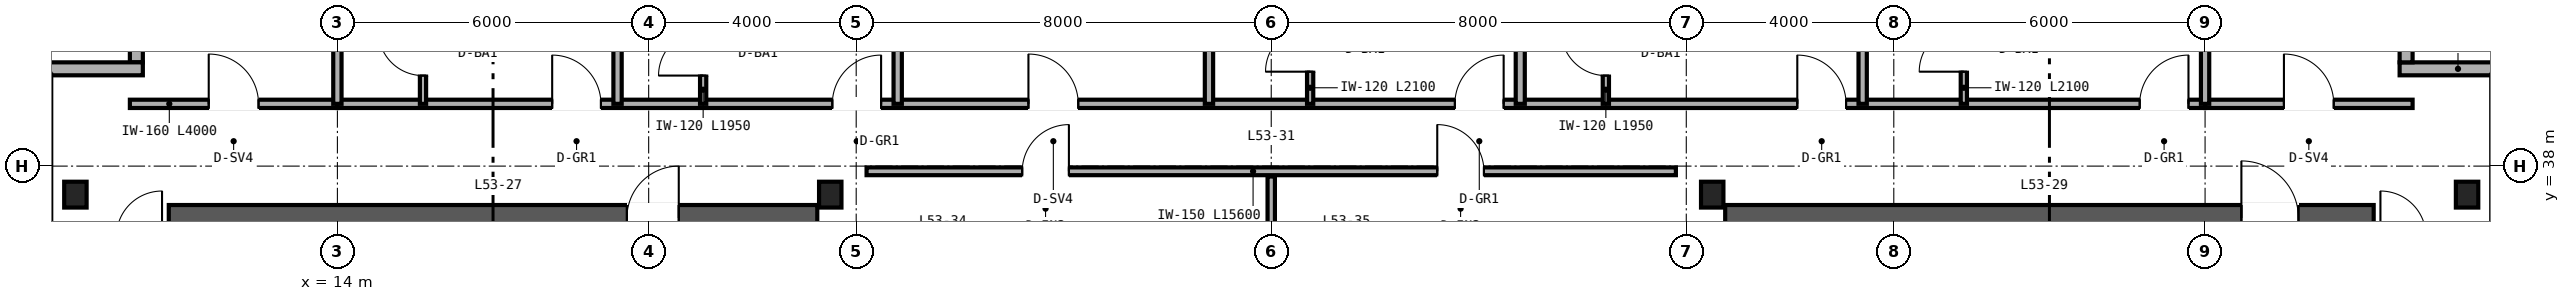
"""IFC4 building model, lengths in metres.
Left out: names, types, materials, properties, quantities, classifications, styles, units other than length and angle.
Written with IfcOpenShell. Run it as: python <this file> out.ifc"""

import sys

from ifc_helpers import new_model, si_unit, direction, frame, frame_2d, origin, origin_2d, place, context, subcontext, project, spatial, rectangle, i_section, extrude, source, transform, mapped, element, fill, save


model = new_model("IFC4")
c1 = context("Model", 3, precision=1e-05, world=origin(), true_north=direction((0.0, 1.0)))
c2 = subcontext(c1, "Body", "Model", "MODEL_VIEW")
j1 = project(units=[si_unit("LENGTHUNIT", "METRE"), si_unit("PLANEANGLEUNIT", "RADIAN")], contexts=[c1])
p1 = place(None, origin())
s1 = spatial("IfcSite", under=j1, at=p1, CompositionType="ELEMENT")
p2 = place(p1, origin())
s2 = spatial("IfcBuilding", under=s1, at=p2, CompositionType="ELEMENT")
p3 = place(p2, frame((0.0, 0.0, 210.0)))
s3 = spatial("IfcBuildingStorey", under=s2, at=p3, CompositionType="ELEMENT", Elevation=210.0)
p4 = place(p3, frame((10.75, 37.0, 0.0), z_axis=(0.0, 0.0, 1.0), x_axis=(1.0, 0.0, 0.0)))
e1 = element("IfcWall", 1, at=p4, inside=s3, PredefinedType="SHEAR", context=c2, shape_type="SweptSolid", body=[
    extrude(rectangle(XDim=12.5, YDim=0.5, at=frame_2d((6.25, 0.0))), origin(), (0.0, 0.0, 1.0), 3.37),
])
p5 = place(p4, frame((8.83, 0.0, 0.0)))
e2 = element("IfcOpeningElement", 2, at=p5, cuts=e1, PredefinedType="OPENING", context=c2, shape_type="SweptSolid", body=[
    extrude(rectangle(XDim=1.0, YDim=2.15, at=frame_2d((0.5, 1.075))), frame((0.0, 0.26, 0.0), z_axis=(0.0, -1.0, 0.0), x_axis=(1.0, 0.0, 0.0)), (0.0, 0.0, 1.0), 0.52),
])
p6 = place(p3, frame((40.75, 37.0, 0.0), z_axis=(0.0, 0.0, 1.0), x_axis=(1.0, 0.0, 0.0)))
e3 = element("IfcWall", 3, at=p6, inside=s3, PredefinedType="SHEAR", context=c2, shape_type="SweptSolid", body=[
    extrude(rectangle(XDim=12.5, YDim=0.5, at=frame_2d((6.25, 0.0))), origin(), (0.0, 0.0, 1.0), 3.37),
])
p7 = place(p6, frame((9.95, 0.0, 0.0)))
e4 = element("IfcOpeningElement", 4, at=p7, cuts=e3, PredefinedType="OPENING", context=c2, shape_type="SweptSolid", body=[
    extrude(rectangle(XDim=1.1, YDim=2.15, at=frame_2d((0.55, 1.075))), frame((0.0, 0.26, 0.0), z_axis=(0.0, -1.0, 0.0), x_axis=(1.0, 0.0, 0.0)), (0.0, 0.0, 1.0), 0.52),
])
m1 = source(origin(), c2, "Body", "SweptSolid", [
    extrude(i_section(OverallWidth=0.432, OverallDepth=0.498, WebThickness=0.056, FlangeThickness=0.089, FilletRadius=0.025, at=origin_2d()), origin(), (0.0, 0.0, 1.0), 3.37),
])
for number, where, z_axis, x_axis in (
    (5, (8.95, 37.45, 0.0), (0.0, 0.0, 1.0), (1.0, 0.0, 0.0)),
    (6, (23.5, 37.45, 0.0), (0.0, 0.0, 1.0), (1.0, 0.0, 0.0)),
    (7, (40.5, 37.45, 0.0), (0.0, 0.0, 1.0), (1.0, 0.0, 0.0)),
    (8, (55.05, 37.45, 0.0), (0.0, 0.0, 1.0), (1.0, 0.0, 0.0)),
):
    element("IfcColumn", number, at=place(p3, frame(where, z_axis=z_axis, x_axis=x_axis)), inside=s3, PredefinedType="COLUMN", context=c2, shape_type="MappedRepresentation", body=[
        mapped(m1, transform((0.0, 0.0, 0.0), scale=1.0)),
    ])
p8 = place(p3, frame((56.0, 39.875, 0.0), z_axis=(0.0, 0.0, 1.0), x_axis=(-1.0, 0.0, 0.0)))
e9 = element("IfcWall", 9, at=p8, inside=s3, PredefinedType="SOLIDWALL", context=c2, shape_type="SweptSolid", body=[
    extrude(rectangle(XDim=2.25, YDim=0.25, at=frame_2d((1.125, 0.0))), origin(), (0.0, 0.0, 1.0), 3.37),
])
for number, where, z_axis, x_axis in (
    (10, (53.875, 40.0, 0.0), (0.0, 0.0, 1.0), (0.0, 1.0, 0.0)),
    (11, (10.125, 42.0, 0.0), (0.0, 0.0, 1.0), (0.0, -1.0, 0.0)),
):
    element("IfcWall", number, at=place(p3, frame(where, z_axis=z_axis, x_axis=x_axis)), inside=s3, PredefinedType="SOLIDWALL", context=c2, shape_type="SweptSolid", body=[
        extrude(rectangle(XDim=2.0, YDim=0.25, at=frame_2d((1.0, 0.0))), origin(), (0.0, 0.0, 1.0), 3.37),
    ])
p9 = place(p3, frame((10.25, 39.875, 0.0), z_axis=(0.0, 0.0, 1.0), x_axis=(-1.0, 0.0, 0.0)))
e12 = element("IfcWall", 12, at=p9, inside=s3, PredefinedType="SOLIDWALL", context=c2, shape_type="SweptSolid", body=[
    extrude(rectangle(XDim=2.25, YDim=0.25, at=frame_2d((1.125, 0.0))), origin(), (0.0, 0.0, 1.0), 3.37),
])
p10 = place(p3, frame((24.2, 37.9, 0.0), z_axis=(0.0, 0.0, 1.0), x_axis=(1.0, 0.0, 0.0)))
e13 = element("IfcWall", 13, at=p10, inside=s3, PredefinedType="PARTITIONING", context=c2, shape_type="SweptSolid", body=[
    extrude(rectangle(XDim=15.6, YDim=0.15, at=frame_2d((7.8, 0.0))), origin(), (0.0, 0.0, 1.0), 3.37),
])
p11 = place(p10, frame((3.0, 0.0, 0.0)))
e14 = element("IfcOpeningElement", 14, at=p11, cuts=e13, PredefinedType="OPENING", context=c2, shape_type="SweptSolid", body=[
    extrude(rectangle(XDim=0.9, YDim=2.15, at=frame_2d((0.45, 1.075))), frame((0.0, 0.085, 0.0), z_axis=(0.0, -1.0, 0.0), x_axis=(1.0, 0.0, 0.0)), (0.0, 0.0, 1.0), 0.17),
])
p12 = place(p10, frame((11.0, 0.0, 0.0)))
e15 = element("IfcOpeningElement", 15, at=p12, cuts=e13, PredefinedType="OPENING", context=c2, shape_type="SweptSolid", body=[
    extrude(rectangle(XDim=0.9, YDim=2.15, at=frame_2d((0.45, 1.075))), frame((0.0, 0.085, 0.0), z_axis=(0.0, -1.0, 0.0), x_axis=(1.0, 0.0, 0.0)), (0.0, 0.0, 1.0), 0.17),
])
p13 = place(p3, frame((32.0, 36.12, 0.0), z_axis=(0.0, 0.0, 1.0), x_axis=(0.0, 1.0, 0.0)))
e16 = element("IfcWall", 16, at=p13, inside=s3, PredefinedType="PARTITIONING", context=c2, shape_type="SweptSolid", body=[
    extrude(rectangle(XDim=1.68, YDim=0.142, at=frame_2d((0.84, 0.0))), origin(), (0.0, 0.0, 1.0), 3.37),
])
p14 = place(p3, frame((10.0, 39.2, 0.0), z_axis=(0.0, 0.0, 1.0), x_axis=(1.0, 0.0, 0.0)))
e17 = element("IfcWall", 17, at=p14, inside=s3, PredefinedType="PARTITIONING", context=c2, shape_type="SweptSolid", body=[
    extrude(rectangle(XDim=4.0, YDim=0.16, at=frame_2d((2.0, 0.0))), origin(), (0.0, 0.0, 1.0), 3.37),
])
p15 = place(p14, frame((1.52, 0.0, 0.0)))
e18 = element("IfcOpeningElement", 18, at=p15, cuts=e17, PredefinedType="OPENING", context=c2, shape_type="SweptSolid", body=[
    extrude(rectangle(XDim=0.96, YDim=2.15, at=frame_2d((0.48, 1.075))), frame((0.0, 0.09, 0.0), z_axis=(0.0, -1.0, 0.0), x_axis=(1.0, 0.0, 0.0)), (0.0, 0.0, 1.0), 0.18),
])
p16 = place(p3, frame((50.0, 39.2, 0.0), z_axis=(0.0, 0.0, 1.0), x_axis=(1.0, 0.0, 0.0)))
e19 = element("IfcWall", 19, at=p16, inside=s3, PredefinedType="PARTITIONING", context=c2, shape_type="SweptSolid", body=[
    extrude(rectangle(XDim=4.0, YDim=0.16, at=frame_2d((2.0, 0.0))), origin(), (0.0, 0.0, 1.0), 3.37),
])
p17 = place(p16, frame((1.52, 0.0, 0.0)))
e20 = element("IfcOpeningElement", 20, at=p17, cuts=e19, PredefinedType="OPENING", context=c2, shape_type="SweptSolid", body=[
    extrude(rectangle(XDim=0.96, YDim=2.15, at=frame_2d((0.48, 1.075))), frame((0.0, 0.09, 0.0), z_axis=(0.0, -1.0, 0.0), x_axis=(1.0, 0.0, 0.0)), (0.0, 0.0, 1.0), 0.18),
])
p18 = place(p3, frame((14.0, 39.2, 0.0), z_axis=(0.0, 0.0, 1.0), x_axis=(1.0, 0.0, 0.0)))
e21 = element("IfcWall", 21, at=p18, inside=s3, PredefinedType="PARTITIONING", context=c2, shape_type="SweptSolid", body=[
    extrude(rectangle(XDim=36.0, YDim=0.16, at=frame_2d((18.0, 0.0))), origin(), (0.0, 0.0, 1.0), 2.913),
])
p19 = place(p18, frame((4.14, 0.0, 0.0)))
e22 = element("IfcOpeningElement", 22, at=p19, cuts=e21, PredefinedType="OPENING", context=c2, shape_type="SweptSolid", body=[
    extrude(rectangle(XDim=0.94, YDim=2.15, at=frame_2d((0.47, 1.075))), frame((0.0, 0.09, 0.0), z_axis=(0.0, -1.0, 0.0), x_axis=(1.0, 0.0, 0.0)), (0.0, 0.0, 1.0), 0.18),
])
p20 = place(p18, frame((9.54, 0.0, 0.0)))
e23 = element("IfcOpeningElement", 23, at=p20, cuts=e21, PredefinedType="OPENING", context=c2, shape_type="SweptSolid", body=[
    extrude(rectangle(XDim=0.94, YDim=2.15, at=frame_2d((0.47, 1.075))), frame((0.0, 0.09, 0.0), z_axis=(0.0, -1.0, 0.0), x_axis=(1.0, 0.0, 0.0)), (0.0, 0.0, 1.0), 0.18),
])
p21 = place(p18, frame((13.32, 0.0, 0.0)))
e24 = element("IfcOpeningElement", 24, at=p21, cuts=e21, PredefinedType="OPENING", context=c2, shape_type="SweptSolid", body=[
    extrude(rectangle(XDim=0.96, YDim=2.15, at=frame_2d((0.48, 1.075))), frame((0.0, 0.09, 0.0), z_axis=(0.0, -1.0, 0.0), x_axis=(1.0, 0.0, 0.0)), (0.0, 0.0, 1.0), 0.18),
])
p22 = place(p18, frame((21.54, 0.0, 0.0)))
e25 = element("IfcOpeningElement", 25, at=p22, cuts=e21, PredefinedType="OPENING", context=c2, shape_type="SweptSolid", body=[
    extrude(rectangle(XDim=0.94, YDim=2.15, at=frame_2d((0.47, 1.075))), frame((0.0, 0.09, 0.0), z_axis=(0.0, -1.0, 0.0), x_axis=(1.0, 0.0, 0.0)), (0.0, 0.0, 1.0), 0.18),
])
p23 = place(p18, frame((28.14, 0.0, 0.0)))
e26 = element("IfcOpeningElement", 26, at=p23, cuts=e21, PredefinedType="OPENING", context=c2, shape_type="SweptSolid", body=[
    extrude(rectangle(XDim=0.94, YDim=2.15, at=frame_2d((0.47, 1.075))), frame((0.0, 0.09, 0.0), z_axis=(0.0, -1.0, 0.0), x_axis=(1.0, 0.0, 0.0)), (0.0, 0.0, 1.0), 0.18),
])
p24 = place(p18, frame((34.74, 0.0, 0.0)))
e27 = element("IfcOpeningElement", 27, at=p24, cuts=e21, PredefinedType="OPENING", context=c2, shape_type="SweptSolid", body=[
    extrude(rectangle(XDim=0.94, YDim=2.15, at=frame_2d((0.47, 1.075))), frame((0.0, 0.09, 0.0), z_axis=(0.0, -1.0, 0.0), x_axis=(1.0, 0.0, 0.0)), (0.0, 0.0, 1.0), 0.18),
])
for number, where, z_axis, x_axis in (
    (28, (14.0, 39.2, 0.0), (0.0, 0.0, 1.0), (0.0, 1.0, 0.0)),
    (29, (50.0, 39.2, 0.0), (0.0, 0.0, 1.0), (0.0, 1.0, 0.0)),
    (30, (19.4, 39.2, 0.0), (0.0, 0.0, 1.0), (0.0, 1.0, 0.0)),
):
    element("IfcWall", number, at=place(p3, frame(where, z_axis=z_axis, x_axis=x_axis)), inside=s3, PredefinedType="PARTITIONING", context=c2, shape_type="SweptSolid", body=[
        extrude(rectangle(XDim=6.44, YDim=0.16, at=frame_2d((3.22, 0.0))), origin(), (0.0, 0.0, 1.0), 2.677),
    ])
p25 = place(p3, frame((15.65, 39.2, 0.0), z_axis=(0.0, 0.0, 1.0), x_axis=(0.0, 1.0, 0.0)))
e31 = element("IfcWall", 31, at=p25, inside=s3, PredefinedType="PARTITIONING", context=c2, shape_type="SweptSolid", body=[
    extrude(rectangle(XDim=1.95, YDim=0.12, at=frame_2d((0.975, 0.0))), origin(), (0.0, 0.0, 1.0), 3.37),
])
p26 = place(p25, frame((0.545, 0.0, 0.0)))
e32 = element("IfcOpeningElement", 32, at=p26, cuts=e31, PredefinedType="OPENING", context=c2, shape_type="SweptSolid", body=[
    extrude(rectangle(XDim=0.86, YDim=2.1, at=frame_2d((0.43, 1.05))), frame((0.0, 0.07, 0.0), z_axis=(0.0, -1.0, 0.0), x_axis=(1.0, 0.0, 0.0)), (0.0, 0.0, 1.0), 0.14),
])
p27 = place(p3, frame((24.8, 39.2, 0.0), z_axis=(0.0, 0.0, 1.0), x_axis=(0.0, 1.0, 0.0)))
e33 = element("IfcWall", 33, at=p27, inside=s3, PredefinedType="PARTITIONING", context=c2, shape_type="SweptSolid", body=[
    extrude(rectangle(XDim=6.44, YDim=0.16, at=frame_2d((3.22, 0.0))), origin(), (0.0, 0.0, 1.0), 2.443),
])
p28 = place(p3, frame((21.05, 39.2, 0.0), z_axis=(0.0, 0.0, 1.0), x_axis=(0.0, 1.0, 0.0)))
e34 = element("IfcWall", 34, at=p28, inside=s3, PredefinedType="PARTITIONING", context=c2, shape_type="SweptSolid", body=[
    extrude(rectangle(XDim=1.95, YDim=0.12, at=frame_2d((0.975, 0.0))), origin(), (0.0, 0.0, 1.0), 3.37),
])
p29 = place(p28, frame((0.545, 0.0, 0.0)))
e35 = element("IfcOpeningElement", 35, at=p29, cuts=e34, PredefinedType="OPENING", context=c2, shape_type="SweptSolid", body=[
    extrude(rectangle(XDim=0.86, YDim=2.1, at=frame_2d((0.43, 1.05))), frame((0.0, 0.07, 0.0), z_axis=(0.0, -1.0, 0.0), x_axis=(1.0, 0.0, 0.0)), (0.0, 0.0, 1.0), 0.14),
])
p30 = place(p3, frame((30.8, 39.2, 0.0), z_axis=(0.0, 0.0, 1.0), x_axis=(0.0, 1.0, 0.0)))
e36 = element("IfcWall", 36, at=p30, inside=s3, PredefinedType="PARTITIONING", context=c2, shape_type="SweptSolid", body=[
    extrude(rectangle(XDim=6.44, YDim=0.16, at=frame_2d((3.22, 0.0))), origin(), (0.0, 0.0, 1.0), 2.443),
])
p31 = place(p3, frame((36.8, 39.2, 0.0), z_axis=(0.0, 0.0, 1.0), x_axis=(0.0, 1.0, 0.0)))
e37 = element("IfcWall", 37, at=p31, inside=s3, PredefinedType="PARTITIONING", context=c2, shape_type="SweptSolid", body=[
    extrude(rectangle(XDim=6.44, YDim=0.175, at=frame_2d((3.22, 0.0))), origin(), (0.0, 0.0, 1.0), 2.443),
])
p32 = place(p3, frame((32.75, 39.2, 0.0), z_axis=(0.0, 0.0, 1.0), x_axis=(0.0, 1.0, 0.0)))
e38 = element("IfcWall", 38, at=p32, inside=s3, PredefinedType="PARTITIONING", context=c2, shape_type="SweptSolid", body=[
    extrude(rectangle(XDim=2.1, YDim=0.12, at=frame_2d((1.05, 0.0))), origin(), (0.0, 0.0, 1.0), 3.37),
])
p33 = place(p32, frame((0.62, 0.0, 0.0)))
e39 = element("IfcOpeningElement", 39, at=p33, cuts=e38, PredefinedType="OPENING", context=c2, shape_type="SweptSolid", body=[
    extrude(rectangle(XDim=0.86, YDim=2.1, at=frame_2d((0.43, 1.05))), frame((0.0, 0.07, 0.0), z_axis=(0.0, -1.0, 0.0), x_axis=(1.0, 0.0, 0.0)), (0.0, 0.0, 1.0), 0.14),
])
p34 = place(p3, frame((43.4, 39.2, 0.0), z_axis=(0.0, 0.0, 1.0), x_axis=(0.0, 1.0, 0.0)))
e40 = element("IfcWall", 40, at=p34, inside=s3, PredefinedType="PARTITIONING", context=c2, shape_type="SweptSolid", body=[
    extrude(rectangle(XDim=6.44, YDim=0.16, at=frame_2d((3.22, 0.0))), origin(), (0.0, 0.0, 1.0), 2.833),
])
p35 = place(p3, frame((38.45, 39.2, 0.0), z_axis=(0.0, 0.0, 1.0), x_axis=(0.0, 1.0, 0.0)))
e41 = element("IfcWall", 41, at=p35, inside=s3, PredefinedType="PARTITIONING", context=c2, shape_type="SweptSolid", body=[
    extrude(rectangle(XDim=1.95, YDim=0.12, at=frame_2d((0.975, 0.0))), origin(), (0.0, 0.0, 1.0), 3.37),
])
p36 = place(p35, frame((0.545, 0.0, 0.0)))
e42 = element("IfcOpeningElement", 42, at=p36, cuts=e41, PredefinedType="OPENING", context=c2, shape_type="SweptSolid", body=[
    extrude(rectangle(XDim=0.86, YDim=2.1, at=frame_2d((0.43, 1.05))), frame((0.0, 0.07, 0.0), z_axis=(0.0, -1.0, 0.0), x_axis=(1.0, 0.0, 0.0)), (0.0, 0.0, 1.0), 0.14),
])
p37 = place(p3, frame((45.35, 39.2, 0.0), z_axis=(0.0, 0.0, 1.0), x_axis=(0.0, 1.0, 0.0)))
e43 = element("IfcWall", 43, at=p37, inside=s3, PredefinedType="PARTITIONING", context=c2, shape_type="SweptSolid", body=[
    extrude(rectangle(XDim=2.1, YDim=0.12, at=frame_2d((1.05, 0.0))), origin(), (0.0, 0.0, 1.0), 3.37),
])
p38 = place(p37, frame((0.62, 0.0, 0.0)))
e44 = element("IfcOpeningElement", 44, at=p38, cuts=e43, PredefinedType="OPENING", context=c2, shape_type="SweptSolid", body=[
    extrude(rectangle(XDim=0.86, YDim=2.1, at=frame_2d((0.43, 1.05))), frame((0.0, 0.07, 0.0), z_axis=(0.0, -1.0, 0.0), x_axis=(1.0, 0.0, 0.0)), (0.0, 0.0, 1.0), 0.14),
])
m2 = source(origin(), c2, "Body", "SweptSolid", [
    extrude(rectangle(XDim=1.0, YDim=2.15, at=frame_2d((0.5, 1.075))), frame((0.0, 0.025, 0.0), z_axis=(0.0, -1.0, 0.0), x_axis=(1.0, 0.0, 0.0)), (0.0, 0.0, 1.0), 0.05),
])
p39 = place(p5, origin())
e45 = element("IfcDoor", 45, at=p39, inside=s3, OperationType="SINGLE_SWING_RIGHT", PredefinedType="DOOR", context=c2, shape_type="MappedRepresentation", body=[
    mapped(m2, transform((0.0, 0.0, 0.0), scale=1.0)),
])
fill(e2, e45)
m3 = source(origin(), c2, "Body", "SweptSolid", [
    extrude(rectangle(XDim=1.1, YDim=2.15, at=frame_2d((0.55, 1.075))), frame((0.0, 0.025, 0.0), z_axis=(0.0, -1.0, 0.0), x_axis=(1.0, 0.0, 0.0)), (0.0, 0.0, 1.0), 0.05),
])
p40 = place(p7, origin())
e46 = element("IfcDoor", 46, at=p40, inside=s3, OperationType="SINGLE_SWING_LEFT", PredefinedType="DOOR", context=c2, shape_type="MappedRepresentation", body=[
    mapped(m3, transform((0.0, 0.0, 0.0), scale=1.0)),
])
fill(e4, e46)
m4 = source(origin(), c2, "Body", "SweptSolid", [
    extrude(rectangle(XDim=0.9, YDim=2.15, at=frame_2d((0.45, 1.075))), frame((0.0, 0.025, 0.0), z_axis=(0.0, -1.0, 0.0), x_axis=(1.0, 0.0, 0.0)), (0.0, 0.0, 1.0), 0.05),
])
p41 = place(p11, origin())
e47 = element("IfcDoor", 47, at=p41, inside=s3, OperationType="SINGLE_SWING_RIGHT", PredefinedType="DOOR", context=c2, shape_type="MappedRepresentation", body=[
    mapped(m4, transform((0.0, 0.0, 0.0), scale=1.0)),
])
fill(e14, e47)
p42 = place(p12, origin())
e48 = element("IfcDoor", 48, at=p42, inside=s3, OperationType="SINGLE_SWING_LEFT", PredefinedType="DOOR", context=c2, shape_type="MappedRepresentation", body=[
    mapped(m4, transform((0.0, 0.0, 0.0), scale=1.0)),
])
fill(e15, e48)
m5 = source(origin(), c2, "Body", "SweptSolid", [
    extrude(rectangle(XDim=0.96, YDim=2.15, at=frame_2d((0.48, 1.075))), frame((0.0, 0.025, 0.0), z_axis=(0.0, -1.0, 0.0), x_axis=(1.0, 0.0, 0.0)), (0.0, 0.0, 1.0), 0.05),
])
p43 = place(p15, origin())
e49 = element("IfcDoor", 49, at=p43, inside=s3, OperationType="SINGLE_SWING_LEFT", PredefinedType="DOOR", context=c2, shape_type="MappedRepresentation", body=[
    mapped(m5, transform((0.0, 0.0, 0.0), scale=1.0)),
])
fill(e18, e49)
p44 = place(p17, origin())
e50 = element("IfcDoor", 50, at=p44, inside=s3, OperationType="SINGLE_SWING_LEFT", PredefinedType="DOOR", context=c2, shape_type="MappedRepresentation", body=[
    mapped(m5, transform((0.0, 0.0, 0.0), scale=1.0)),
])
fill(e20, e50)
m6 = source(origin(), c2, "Body", "SweptSolid", [
    extrude(rectangle(XDim=0.86, YDim=2.1, at=frame_2d((0.43, 1.05))), frame((0.0, 0.025, 0.0), z_axis=(0.0, -1.0, 0.0), x_axis=(1.0, 0.0, 0.0)), (0.0, 0.0, 1.0), 0.05),
])
p45 = place(p26, origin())
e51 = element("IfcDoor", 51, at=p45, inside=s3, OperationType="SINGLE_SWING_RIGHT", PredefinedType="DOOR", context=c2, shape_type="MappedRepresentation", body=[
    mapped(m6, transform((0.0, 0.0, 0.0), scale=1.0)),
])
fill(e32, e51)
p46 = place(p29, origin())
e52 = element("IfcDoor", 52, at=p46, inside=s3, OperationType="SINGLE_SWING_LEFT", PredefinedType="DOOR", context=c2, shape_type="MappedRepresentation", body=[
    mapped(m6, transform((0.0, 0.0, 0.0), scale=1.0)),
])
fill(e35, e52)
p47 = place(p33, origin())
e53 = element("IfcDoor", 53, at=p47, inside=s3, OperationType="SINGLE_SWING_LEFT", PredefinedType="DOOR", context=c2, shape_type="MappedRepresentation", body=[
    mapped(m6, transform((0.0, 0.0, 0.0), scale=1.0)),
])
fill(e39, e53)
p48 = place(p36, origin())
e54 = element("IfcDoor", 54, at=p48, inside=s3, OperationType="SINGLE_SWING_RIGHT", PredefinedType="DOOR", context=c2, shape_type="MappedRepresentation", body=[
    mapped(m6, transform((0.0, 0.0, 0.0), scale=1.0)),
])
fill(e42, e54)
p49 = place(p38, origin())
e55 = element("IfcDoor", 55, at=p49, inside=s3, OperationType="SINGLE_SWING_LEFT", PredefinedType="DOOR", context=c2, shape_type="MappedRepresentation", body=[
    mapped(m6, transform((0.0, 0.0, 0.0), scale=1.0)),
])
fill(e44, e55)
m7 = source(origin(), c2, "Body", "SweptSolid", [
    extrude(rectangle(XDim=0.94, YDim=2.15, at=frame_2d((0.47, 1.075))), frame((0.0, 0.025, 0.0), z_axis=(0.0, -1.0, 0.0), x_axis=(1.0, 0.0, 0.0)), (0.0, 0.0, 1.0), 0.05),
])
p50 = place(p19, origin())
e56 = element("IfcDoor", 56, at=p50, inside=s3, OperationType="SINGLE_SWING_LEFT", PredefinedType="DOOR", context=c2, shape_type="MappedRepresentation", body=[
    mapped(m7, transform((0.0, 0.0, 0.0), scale=1.0)),
])
fill(e22, e56)
p51 = place(p20, origin())
e57 = element("IfcDoor", 57, at=p51, inside=s3, OperationType="SINGLE_SWING_RIGHT", PredefinedType="DOOR", context=c2, shape_type="MappedRepresentation", body=[
    mapped(m7, transform((0.0, 0.0, 0.0), scale=1.0)),
])
fill(e23, e57)
p52 = place(p21, origin())
e58 = element("IfcDoor", 58, at=p52, inside=s3, OperationType="SINGLE_SWING_LEFT", PredefinedType="DOOR", context=c2, shape_type="MappedRepresentation", body=[
    mapped(m5, transform((0.0, 0.0, 0.0), scale=1.0)),
])
fill(e24, e58)
p53 = place(p22, origin())
e59 = element("IfcDoor", 59, at=p53, inside=s3, OperationType="SINGLE_SWING_RIGHT", PredefinedType="DOOR", context=c2, shape_type="MappedRepresentation", body=[
    mapped(m7, transform((0.0, 0.0, 0.0), scale=1.0)),
])
fill(e25, e59)
p54 = place(p23, origin())
e60 = element("IfcDoor", 60, at=p54, inside=s3, OperationType="SINGLE_SWING_LEFT", PredefinedType="DOOR", context=c2, shape_type="MappedRepresentation", body=[
    mapped(m7, transform((0.0, 0.0, 0.0), scale=1.0)),
])
fill(e26, e60)
p55 = place(p24, origin())
e61 = element("IfcDoor", 61, at=p55, inside=s3, OperationType="SINGLE_SWING_RIGHT", PredefinedType="DOOR", context=c2, shape_type="MappedRepresentation", body=[
    mapped(m7, transform((0.0, 0.0, 0.0), scale=1.0)),
])
fill(e27, e61)
save(model, sys.argv[1])
